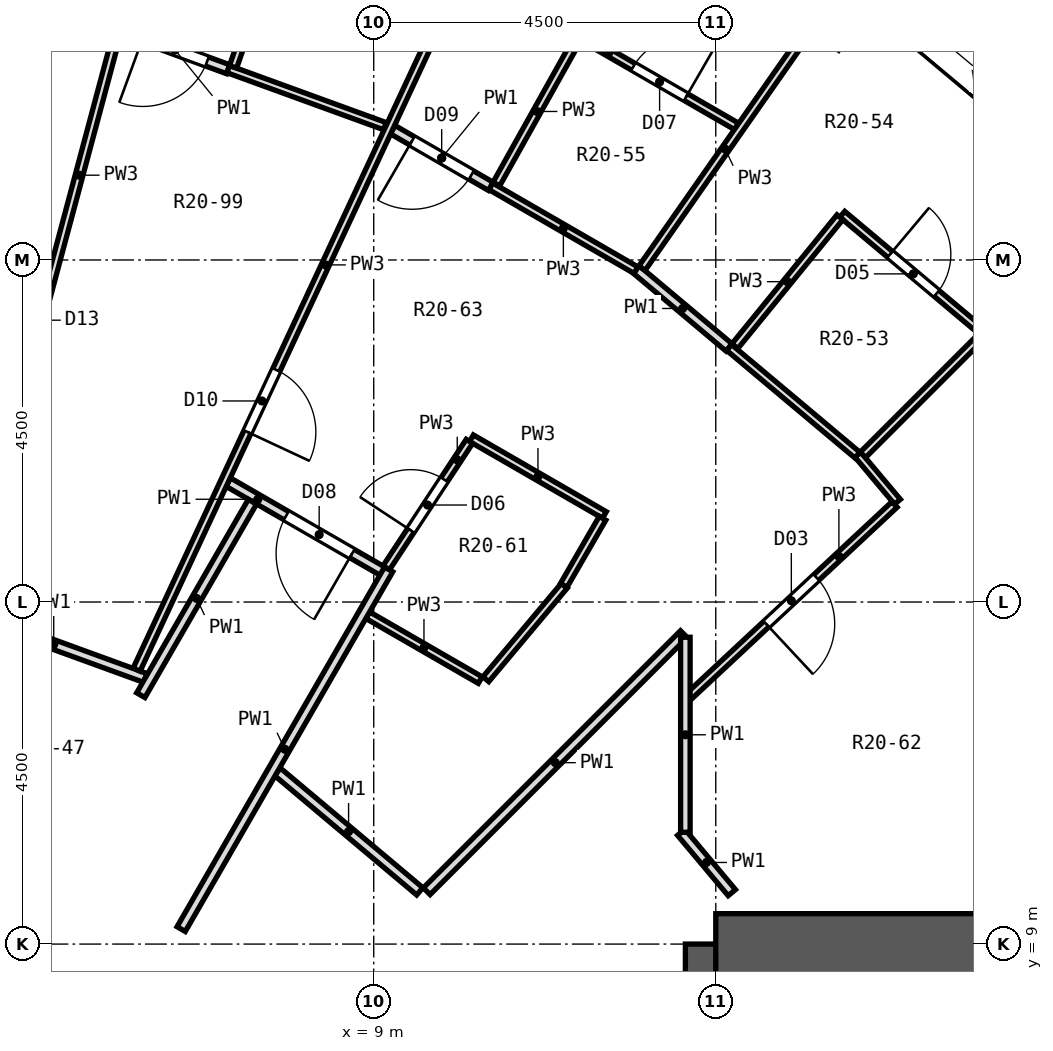
"""IFC4 building model, lengths in metres.
Left out: names, types, materials, properties, quantities, classifications, styles, units other than length and angle.
Written with IfcOpenShell. Run it as: python <this file> out.ifc"""

import sys

from ifc_helpers import new_model, si_unit, direction, frame, frame_2d, origin, place, context, subcontext, project, spatial, rectangle, extrude, element, fill, save


model = new_model("IFC4")
c1 = context("Model", 3, precision=1e-05, world=origin(), true_north=direction((0.0, 1.0)))
c2 = subcontext(c1, "Body", "Model", "MODEL_VIEW")
j1 = project(units=[si_unit("LENGTHUNIT", "METRE"), si_unit("PLANEANGLEUNIT", "RADIAN")], contexts=[c1])
p1 = place(None, origin())
s1 = spatial("IfcSite", under=j1, at=p1, CompositionType="ELEMENT")
p2 = place(p1, origin())
s2 = spatial("IfcBuilding", under=s1, at=p2, CompositionType="ELEMENT")
p3 = place(p2, frame((0.0, 0.0, 121.6)))
s3 = spatial("IfcBuildingStorey", under=s2, at=p3, CompositionType="ELEMENT", Elevation=121.6)
p4 = place(p3, frame((13.5, -9.0, 0.0), z_axis=(0.0, 0.0, 1.0), x_axis=(0.0, 1.0, 0.0)))
e1 = element("IfcWall", 1, at=p4, inside=s3, PredefinedType="SHEAR", context=c2, shape_type="SweptSolid", body=[
    extrude(rectangle(XDim=18.0, YDim=0.8, at=frame_2d((9.0, 0.0))), origin(), (0.0, 0.0, 1.0), 3.3),
])
p5 = place(p4, frame((15.4, 0.0, 0.0)))
e2 = element("IfcOpeningElement", 2, at=p5, cuts=e1, PredefinedType="OPENING", context=c2, shape_type="SweptSolid", body=[
    extrude(rectangle(XDim=1.2, YDim=2.1, at=frame_2d((0.6, 1.05))), frame((0.0, 0.412, 0.0), z_axis=(0.0, -1.0, 0.0), x_axis=(1.0, 0.0, 0.0)), (0.0, 0.0, 1.0), 0.824),
])
p6 = place(p4, frame((1.4, 0.0, 0.0)))
e3 = element("IfcOpeningElement", 3, at=p6, cuts=e1, PredefinedType="OPENING", context=c2, shape_type="SweptSolid", body=[
    extrude(rectangle(XDim=1.2, YDim=2.1, at=frame_2d((0.6, 1.05))), frame((0.0, 0.412, 0.0), z_axis=(0.0, -1.0, 0.0), x_axis=(1.0, 0.0, 0.0)), (0.0, 0.0, 1.0), 0.824),
])
p7 = place(p4, frame((7.5, 0.0, 0.0)))
e4 = element("IfcOpeningElement", 4, at=p7, cuts=e1, PredefinedType="OPENING", context=c2, shape_type="SweptSolid", body=[
    extrude(rectangle(XDim=3.0, YDim=2.4, at=frame_2d((1.5, 1.2))), frame((0.0, 0.412, 0.0), z_axis=(0.0, -1.0, 0.0), x_axis=(1.0, 0.0, 0.0)), (0.0, 0.0, 1.0), 0.824),
])
p8 = place(p3, frame((13.5, 9.0, 0.0), z_axis=(0.0, 0.0, 1.0), x_axis=(1.0, 0.0, 0.0)))
e5 = element("IfcWall", 5, at=p8, inside=s3, PredefinedType="SHEAR", context=c2, shape_type="SweptSolid", body=[
    extrude(rectangle(XDim=10.4, YDim=0.8, at=frame_2d((5.2, 0.0))), origin(), (0.0, 0.0, 1.0), 3.3),
])
p9 = place(p3, frame((18.494, 19.202, 0.0), z_axis=(0.0, 0.0, 1.0), x_axis=(-0.766055462616, 0.642774476932, 0.0)))
e6 = element("IfcWall", 6, at=p9, inside=s3, PredefinedType="SOLIDWALL", context=c2, shape_type="SweptSolid", body=[
    extrude(rectangle(XDim=3.648, YDim=0.6, at=frame_2d((1.824, 0.0))), origin(), (0.0, 0.0, 1.0), 2.8),
])
p10 = place(p9, frame((0.674, 0.0, 0.9)))
e7 = element("IfcOpeningElement", 7, at=p10, cuts=e6, PredefinedType="OPENING", context=c2, shape_type="SweptSolid", body=[
    extrude(rectangle(XDim=2.3, YDim=1.8, at=frame_2d((1.15, 0.9))), frame((0.0, 0.312, 0.0), z_axis=(0.0, -1.0, 0.0), x_axis=(1.0, 0.0, 0.0)), (0.0, 0.0, 1.0), 0.624),
])
p11 = place(p3, frame((13.045, 10.47, 0.0), z_axis=(0.0, 0.0, 1.0), x_axis=(0.642683640722, -0.766131671417, 0.0)))
e8 = element("IfcWall", 8, at=p11, inside=s3, PredefinedType="PARTITIONING", context=c2, shape_type="SweptSolid", body=[
    extrude(rectangle(XDim=1.036, YDim=0.125, at=frame_2d((0.518, 0.0))), origin(), (0.0, 0.0, 1.0), 2.8),
])
p12 = place(p3, frame((15.368, 15.44, 0.0), z_axis=(0.0, 0.0, 1.0), x_axis=(0.643079214365, -0.765799663131, 0.0)))
e9 = element("IfcWall", 9, at=p12, inside=s3, PredefinedType="PARTITIONING", context=c2, shape_type="SweptSolid", body=[
    extrude(rectangle(XDim=0.812, YDim=0.1, at=frame_2d((0.406, 0.0))), origin(), (0.0, 0.0, 1.0), 2.8),
])
p13 = place(p3, frame((7.733, 11.267, 0.0), z_axis=(0.0, 0.0, 1.0), x_axis=(0.765785489597, -0.643096092293, 0.0)))
e10 = element("IfcWall", 10, at=p13, inside=s3, PredefinedType="PARTITIONING", context=c2, shape_type="SweptSolid", body=[
    extrude(rectangle(XDim=2.446, YDim=0.125, at=frame_2d((1.223, 0.0))), origin(), (0.0, 0.0, 1.0), 2.8),
])
p14 = place(p3, frame((13.674, 16.85, 0.0), z_axis=(0.0, 0.0, 1.0), x_axis=(0.766138779905, -0.642675166725, 0.0)))
e11 = element("IfcWall", 11, at=p14, inside=s3, PredefinedType="PARTITIONING", context=c2, shape_type="SweptSolid", body=[
    extrude(rectangle(XDim=2.205, YDim=0.1, at=frame_2d((1.103, 0.0))), origin(), (0.0, 0.0, 1.0), 2.8),
])
p15 = place(p3, frame((12.454, 17.874, 0.0), z_axis=(0.0, 0.0, 1.0), x_axis=(0.765991783553, -0.642850361693, 0.0)))
e12 = element("IfcWall", 12, at=p15, inside=s3, PredefinedType="PARTITIONING", context=c2, shape_type="SweptSolid", body=[
    extrude(rectangle(XDim=1.592, YDim=0.125, at=frame_2d((0.796, 0.0))), origin(), (0.0, 0.0, 1.0), 2.8),
])
p16 = place(p3, frame((15.165, 18.601, 0.0), z_axis=(0.0, 0.0, 1.0), x_axis=(0.765894146118, -0.642966684161, 0.0)))
e13 = element("IfcWall", 13, at=p16, inside=s3, PredefinedType="PARTITIONING", context=c2, shape_type="SweptSolid", body=[
    extrude(rectangle(XDim=2.439, YDim=0.1, at=frame_2d((1.219, 0.0))), origin(), (0.0, 0.0, 1.0), 2.8),
])
p17 = place(p16, frame((0.819, 0.0, 0.0)))
e14 = element("IfcOpeningElement", 14, at=p17, cuts=e13, PredefinedType="OPENING", context=c2, shape_type="SweptSolid", body=[
    extrude(rectangle(XDim=0.8, YDim=2.1, at=frame_2d((0.4, 1.05))), frame((0.0, 0.062, 0.0), z_axis=(0.0, -1.0, 0.0), x_axis=(1.0, 0.0, 0.0)), (0.0, 0.0, 1.0), 0.124),
])
p18 = place(p3, frame((8.921, 13.327, 0.0), z_axis=(0.0, 0.0, 1.0), x_axis=(0.866168931404, -0.499751320429, 0.0)))
e15 = element("IfcWall", 15, at=p18, inside=s3, PredefinedType="PARTITIONING", context=c2, shape_type="SweptSolid", body=[
    extrude(rectangle(XDim=1.708, YDim=0.1, at=frame_2d((0.854, 0.0))), origin(), (0.0, 0.0, 1.0), 2.8),
])
p19 = place(p3, frame((7.086, 15.077, 0.0), z_axis=(0.0, 0.0, 1.0), x_axis=(0.866192474201, -0.499710513836, 0.0)))
e16 = element("IfcWall", 16, at=p19, inside=s3, PredefinedType="PARTITIONING", context=c2, shape_type="SweptSolid", body=[
    extrude(rectangle(XDim=2.36, YDim=0.125, at=frame_2d((1.18, 0.0))), origin(), (0.0, 0.0, 1.0), 2.8),
])
p20 = place(p19, frame((0.881, 0.0, 0.0)))
e17 = element("IfcOpeningElement", 17, at=p20, cuts=e16, PredefinedType="OPENING", context=c2, shape_type="SweptSolid", body=[
    extrude(rectangle(XDim=1.0, YDim=2.1, at=frame_2d((0.5, 1.05))), frame((0.0, 0.074, 0.0), z_axis=(0.0, -1.0, 0.0), x_axis=(1.0, 0.0, 0.0)), (0.0, 0.0, 1.0), 0.149),
])
p21 = place(p3, frame((10.286, 15.655, 0.0), z_axis=(0.0, 0.0, 1.0), x_axis=(0.865980246016, -0.500078207394, 0.0)))
e18 = element("IfcWall", 18, at=p21, inside=s3, PredefinedType="PARTITIONING", context=c2, shape_type="SweptSolid", body=[
    extrude(rectangle(XDim=2.02, YDim=0.1, at=frame_2d((1.01, 0.0))), origin(), (0.0, 0.0, 1.0), 2.8),
])
p22 = place(p3, frame((10.54, 18.969, 0.0), z_axis=(0.0, 0.0, 1.0), x_axis=(0.866006764117, -0.500032283461, 0.0)))
e19 = element("IfcWall", 19, at=p22, inside=s3, PredefinedType="PARTITIONING", context=c2, shape_type="SweptSolid", body=[
    extrude(rectangle(XDim=2.205, YDim=0.1, at=frame_2d((1.103, 0.0))), origin(), (0.0, 0.0, 1.0), 2.8),
])
p23 = place(p3, frame((9.248, 19.715, 0.0), z_axis=(0.0, 0.0, 1.0), x_axis=(0.865896584481, -0.500223055231, 0.0)))
e20 = element("IfcWall", 20, at=p23, inside=s3, PredefinedType="PARTITIONING", context=c2, shape_type="SweptSolid", body=[
    extrude(rectangle(XDim=1.491, YDim=0.125, at=frame_2d((0.746, 0.0))), origin(), (0.0, 0.0, 1.0), 2.8),
])
p24 = place(p23, frame((0.296, 0.0, 0.0)))
e21 = element("IfcOpeningElement", 21, at=p24, cuts=e20, PredefinedType="OPENING", context=c2, shape_type="SweptSolid", body=[
    extrude(rectangle(XDim=0.9, YDim=2.1, at=frame_2d((0.45, 1.05))), frame((0.0, 0.074, 0.0), z_axis=(0.0, -1.0, 0.0), x_axis=(1.0, 0.0, 0.0)), (0.0, 0.0, 1.0), 0.149),
])
p25 = place(p3, frame((11.705, 20.952, 0.0), z_axis=(0.0, 0.0, 1.0), x_axis=(0.865906392454, -0.500206077039, 0.0)))
e22 = element("IfcWall", 22, at=p25, inside=s3, PredefinedType="PARTITIONING", context=c2, shape_type="SweptSolid", body=[
    extrude(rectangle(XDim=2.389, YDim=0.1, at=frame_2d((1.194, 0.0))), origin(), (0.0, 0.0, 1.0), 2.8),
])
p26 = place(p25, frame((0.82, 0.0, 0.0)))
e23 = element("IfcOpeningElement", 23, at=p26, cuts=e22, PredefinedType="OPENING", context=c2, shape_type="SweptSolid", body=[
    extrude(rectangle(XDim=0.8, YDim=2.1, at=frame_2d((0.4, 1.05))), frame((0.0, 0.062, 0.0), z_axis=(0.0, -1.0, 0.0), x_axis=(1.0, 0.0, 0.0)), (0.0, 0.0, 1.0), 0.124),
])
p27 = place(p3, frame((5.684, 21.021, 0.0), z_axis=(0.0, 0.0, 1.0), x_axis=(0.939314629693, -0.343056885143, 0.0)))
e24 = element("IfcWall", 24, at=p27, inside=s3, PredefinedType="PARTITIONING", context=c2, shape_type="SweptSolid", body=[
    extrude(rectangle(XDim=1.492, YDim=0.125, at=frame_2d((0.746, 0.0))), origin(), (0.0, 0.0, 1.0), 2.8),
])
p28 = place(p27, frame((0.296, 0.0, 0.0)))
e25 = element("IfcOpeningElement", 25, at=p28, cuts=e24, PredefinedType="OPENING", context=c2, shape_type="SweptSolid", body=[
    extrude(rectangle(XDim=0.9, YDim=2.1, at=frame_2d((0.45, 1.05))), frame((0.0, 0.074, 0.0), z_axis=(0.0, -1.0, 0.0), x_axis=(1.0, 0.0, 0.0)), (0.0, 0.0, 1.0), 0.149),
])
p29 = place(p3, frame((3.585, 13.379, 0.0), z_axis=(0.0, 0.0, 1.0), x_axis=(0.939651552045, -0.342132957691, 0.0)))
e26 = element("IfcWall", 26, at=p29, inside=s3, PredefinedType="PARTITIONING", context=c2, shape_type="SweptSolid", body=[
    extrude(rectangle(XDim=2.564, YDim=0.125, at=frame_2d((1.282, 0.0))), origin(), (0.0, 0.0, 1.0), 2.8),
])
p30 = place(p3, frame((7.086, 20.51, 0.0), z_axis=(0.0, 0.0, 1.0), x_axis=(0.939734879809, -0.341904015289, 0.0)))
e27 = element("IfcWall", 27, at=p30, inside=s3, PredefinedType="PARTITIONING", context=c2, shape_type="SweptSolid", body=[
    extrude(rectangle(XDim=2.192, YDim=0.1, at=frame_2d((1.096, 0.0))), origin(), (0.0, 0.0, 1.0), 2.8),
])
p31 = place(p3, frame((13.146, 12.259, 0.0), z_axis=(0.0, 0.0, 1.0), x_axis=(0.731186864942, 0.682177226633, 0.0)))
e28 = element("IfcWall", 28, at=p31, inside=s3, PredefinedType="PARTITIONING", context=c2, shape_type="SweptSolid", body=[
    extrude(rectangle(XDim=3.701, YDim=0.1, at=frame_2d((1.851, 0.0))), origin(), (0.0, 0.0, 1.0), 2.8),
])
p32 = place(p31, frame((1.394, 0.0, 0.0)))
e29 = element("IfcOpeningElement", 29, at=p32, cuts=e28, PredefinedType="OPENING", context=c2, shape_type="SweptSolid", body=[
    extrude(rectangle(XDim=0.9, YDim=2.1, at=frame_2d((0.45, 1.05))), frame((0.0, 0.062, 0.0), z_axis=(0.0, -1.0, 0.0), x_axis=(1.0, 0.0, 0.0)), (0.0, 0.0, 1.0), 0.124),
])
p33 = place(p3, frame((15.436, 15.436, 0.0), z_axis=(0.0, 0.0, 1.0), x_axis=(0.707106781187, 0.707106781187, 0.0)))
e30 = element("IfcWall", 30, at=p33, inside=s3, PredefinedType="PARTITIONING", context=c2, shape_type="SweptSolid", body=[
    extrude(rectangle(XDim=2.208, YDim=0.1, at=frame_2d((1.104, 0.0))), origin(), (0.0, 0.0, 1.0), 2.8),
])
p34 = place(p3, frame((9.697, 9.695, 0.0), z_axis=(0.0, 0.0, 1.0), x_axis=(0.707106781187, 0.707106781187, 0.0)))
e31 = element("IfcWall", 31, at=p34, inside=s3, PredefinedType="PARTITIONING", context=c2, shape_type="SweptSolid", body=[
    extrude(rectangle(XDim=4.784, YDim=0.125, at=frame_2d((2.392, 0.0))), origin(), (0.0, 0.0, 1.0), 2.8),
])
p35 = place(p3, frame((10.475, 12.484, 0.0), z_axis=(0.0, 0.0, 1.0), x_axis=(0.642782067074, 0.766049093889, 0.0)))
e32 = element("IfcWall", 32, at=p35, inside=s3, PredefinedType="PARTITIONING", context=c2, shape_type="SweptSolid", body=[
    extrude(rectangle(XDim=1.606, YDim=0.1, at=frame_2d((0.803, 0.0))), origin(), (0.0, 0.0, 1.0), 2.8),
])
p36 = place(p3, frame((13.751, 16.866, 0.0), z_axis=(0.0, 0.0, 1.0), x_axis=(0.631692824826, 0.775218791738, 0.0)))
e33 = element("IfcWall", 33, at=p36, inside=s3, PredefinedType="PARTITIONING", context=c2, shape_type="SweptSolid", body=[
    extrude(rectangle(XDim=2.188, YDim=0.1, at=frame_2d((1.094, 0.0))), origin(), (0.0, 0.0, 1.0), 2.8),
])
p37 = place(p3, frame((12.53, 17.892, 0.0), z_axis=(0.0, 0.0, 1.0), x_axis=(0.573235132975, 0.819390921553, 0.0)))
e34 = element("IfcWall", 34, at=p37, inside=s3, PredefinedType="PARTITIONING", context=c2, shape_type="SweptSolid", body=[
    extrude(rectangle(XDim=3.823, YDim=0.1, at=frame_2d((1.911, 0.0))), origin(), (0.0, 0.0, 1.0), 2.8),
])
p38 = place(p3, frame((9.165, 13.95, 0.0), z_axis=(0.0, 0.0, 1.0), x_axis=(0.549454342873, 0.835523742989, 0.0)))
e35 = element("IfcWall", 35, at=p38, inside=s3, PredefinedType="PARTITIONING", context=c2, shape_type="SweptSolid", body=[
    extrude(rectangle(XDim=1.991, YDim=0.1, at=frame_2d((0.996, 0.0))), origin(), (0.0, 0.0, 1.0), 2.8),
])
p39 = place(p38, frame((0.589, 0.0, 0.0)))
e36 = element("IfcOpeningElement", 36, at=p39, cuts=e35, PredefinedType="OPENING", context=c2, shape_type="SweptSolid", body=[
    extrude(rectangle(XDim=0.8, YDim=2.1, at=frame_2d((0.4, 1.05))), frame((0.0, 0.062, 0.0), z_axis=(0.0, -1.0, 0.0), x_axis=(1.0, 0.0, 0.0)), (0.0, 0.0, 1.0), 0.124),
])
p40 = place(p3, frame((11.5, 13.719, 0.0), z_axis=(0.0, 0.0, 1.0), x_axis=(0.500337452138, 0.865830488022, 0.0)))
e37 = element("IfcWall", 37, at=p40, inside=s3, PredefinedType="PARTITIONING", context=c2, shape_type="SweptSolid", body=[
    extrude(rectangle(XDim=1.019, YDim=0.1, at=frame_2d((0.51, 0.0))), origin(), (0.0, 0.0, 1.0), 2.8),
])
p41 = place(p3, frame((6.467, 9.197, 0.0), z_axis=(0.0, 0.0, 1.0), x_axis=(0.499744377638, 0.866172937132, 0.0)))
e38 = element("IfcWall", 38, at=p41, inside=s3, PredefinedType="PARTITIONING", context=c2, shape_type="SweptSolid", body=[
    extrude(rectangle(XDim=5.463, YDim=0.125, at=frame_2d((2.731, 0.0))), origin(), (0.0, 0.0, 1.0), 2.8),
])
p42 = place(p3, frame((5.936, 12.275, 0.0), z_axis=(0.0, 0.0, 1.0), x_axis=(0.499715257766, 0.866189737388, 0.0)))
e39 = element("IfcWall", 39, at=p42, inside=s3, PredefinedType="PARTITIONING", context=c2, shape_type="SweptSolid", body=[
    extrude(rectangle(XDim=2.937, YDim=0.125, at=frame_2d((1.469, 0.0))), origin(), (0.0, 0.0, 1.0), 2.8),
])
p43 = place(p3, frame((10.614, 18.999, 0.0), z_axis=(0.0, 0.0, 1.0), x_axis=(0.487811352464, 0.872949073204, 0.0)))
e40 = element("IfcWall", 40, at=p43, inside=s3, PredefinedType="PARTITIONING", context=c2, shape_type="SweptSolid", body=[
    extrude(rectangle(XDim=2.188, YDim=0.1, at=frame_2d((1.094, 0.0))), origin(), (0.0, 0.0, 1.0), 2.8),
])
p44 = place(p3, frame((5.881, 12.611, 0.0), z_axis=(0.0, 0.0, 1.0), x_axis=(0.422604500324, 0.906314203964, 0.0)))
e41 = element("IfcWall", 41, at=p44, inside=s3, PredefinedType="PARTITIONING", context=c2, shape_type="SweptSolid", body=[
    extrude(rectangle(XDim=11.75, YDim=0.1, at=frame_2d((5.875, 0.0))), origin(), (0.0, 0.0, 1.0), 2.8),
])
p45 = place(p44, frame((3.45, 0.0, 0.0)))
e42 = element("IfcOpeningElement", 42, at=p45, cuts=e41, PredefinedType="OPENING", context=c2, shape_type="SweptSolid", body=[
    extrude(rectangle(XDim=0.9, YDim=2.1, at=frame_2d((0.45, 1.05))), frame((0.0, 0.062, 0.0), z_axis=(0.0, -1.0, 0.0), x_axis=(1.0, 0.0, 0.0)), (0.0, 0.0, 1.0), 0.124),
])
p46 = place(p3, frame((7.149, 20.541, 0.0), z_axis=(0.0, 0.0, 1.0), x_axis=(0.328718620018, 0.944427905588, 0.0)))
e43 = element("IfcWall", 43, at=p46, inside=s3, PredefinedType="PARTITIONING", context=c2, shape_type="SweptSolid", body=[
    extrude(rectangle(XDim=2.2, YDim=0.1, at=frame_2d((1.1, 0.0))), origin(), (0.0, 0.0, 1.0), 2.8),
])
p47 = place(p3, frame((3.605, 13.44, 0.0), z_axis=(0.0, 0.0, 1.0), x_axis=(0.258538057112, 0.966001072994, 0.0)))
e44 = element("IfcWall", 44, at=p47, inside=s3, PredefinedType="PARTITIONING", context=c2, shape_type="SweptSolid", body=[
    extrude(rectangle(XDim=11.75, YDim=0.1, at=frame_2d((5.875, 0.0))), origin(), (0.0, 0.0, 1.0), 2.8),
])
p48 = place(p47, frame((3.45, 0.0, 0.0)))
e45 = element("IfcOpeningElement", 45, at=p48, cuts=e44, PredefinedType="OPENING", context=c2, shape_type="SweptSolid", body=[
    extrude(rectangle(XDim=0.9, YDim=2.1, at=frame_2d((0.45, 1.05))), frame((0.0, 0.062, 0.0), z_axis=(0.0, -1.0, 0.0), x_axis=(1.0, 0.0, 0.0)), (0.0, 0.0, 1.0), 0.124),
])
p49 = place(p3, frame((13.1, 10.47, 0.0), z_axis=(0.0, 0.0, 1.0), x_axis=(0.0, 1.0, 0.0)))
e46 = element("IfcWall", 46, at=p49, inside=s3, PredefinedType="PARTITIONING", context=c2, shape_type="SweptSolid", body=[
    extrude(rectangle(XDim=2.566, YDim=0.125, at=frame_2d((1.283, 0.0))), origin(), (0.0, 0.0, 1.0), 2.8),
])
p50 = place(p10, origin())
e47 = element("IfcWindow", 47, at=p50, inside=s3, PartitioningType="SINGLE_PANEL", PredefinedType="WINDOW", context=c2, shape_type="SweptSolid", body=[
    extrude(rectangle(XDim=2.3, YDim=1.8, at=frame_2d((1.15, 0.9))), frame((0.0, 0.18, 0.0), z_axis=(0.0, -1.0, 0.0), x_axis=(1.0, 0.0, 0.0)), (0.0, 0.0, 1.0), 0.06),
])
fill(e7, e47)
p51 = place(p32, frame((0.9, 0.0, 0.0), z_axis=(0.0, 0.0, 1.0), x_axis=(-1.0, 0.0, 0.0)))
e48 = element("IfcDoor", 48, at=p51, inside=s3, OperationType="SINGLE_SWING_RIGHT", PredefinedType="DOOR", context=c2, shape_type="SweptSolid", body=[
    extrude(rectangle(XDim=0.9, YDim=2.1, at=frame_2d((0.45, 1.05))), frame((0.0, 0.025, 0.0), z_axis=(0.0, -1.0, 0.0), x_axis=(1.0, 0.0, 0.0)), (0.0, 0.0, 1.0), 0.05),
])
fill(e29, e48)
p52 = place(p17, origin())
e49 = element("IfcDoor", 49, at=p52, inside=s3, OperationType="SINGLE_SWING_LEFT", PredefinedType="DOOR", context=c2, shape_type="SweptSolid", body=[
    extrude(rectangle(XDim=0.8, YDim=2.1, at=frame_2d((0.4, 1.05))), frame((0.0, 0.025, 0.0), z_axis=(0.0, -1.0, 0.0), x_axis=(1.0, 0.0, 0.0)), (0.0, 0.0, 1.0), 0.05),
])
fill(e14, e49)
p53 = place(p39, origin())
e50 = element("IfcDoor", 50, at=p53, inside=s3, OperationType="SINGLE_SWING_LEFT", PredefinedType="DOOR", context=c2, shape_type="SweptSolid", body=[
    extrude(rectangle(XDim=0.8, YDim=2.1, at=frame_2d((0.4, 1.05))), frame((0.0, 0.025, 0.0), z_axis=(0.0, -1.0, 0.0), x_axis=(1.0, 0.0, 0.0)), (0.0, 0.0, 1.0), 0.05),
])
fill(e36, e50)
p54 = place(p26, origin())
e51 = element("IfcDoor", 51, at=p54, inside=s3, OperationType="SINGLE_SWING_RIGHT", PredefinedType="DOOR", context=c2, shape_type="SweptSolid", body=[
    extrude(rectangle(XDim=0.8, YDim=2.1, at=frame_2d((0.4, 1.05))), frame((0.0, 0.025, 0.0), z_axis=(0.0, -1.0, 0.0), x_axis=(1.0, 0.0, 0.0)), (0.0, 0.0, 1.0), 0.05),
])
fill(e23, e51)
p55 = place(p20, frame((1.0, 0.0, 0.0), z_axis=(0.0, 0.0, 1.0), x_axis=(-1.0, 0.0, 0.0)))
e52 = element("IfcDoor", 52, at=p55, inside=s3, OperationType="SINGLE_SWING_LEFT", PredefinedType="DOOR", context=c2, shape_type="SweptSolid", body=[
    extrude(rectangle(XDim=1.0, YDim=2.1, at=frame_2d((0.5, 1.05))), frame((0.0, 0.025, 0.0), z_axis=(0.0, -1.0, 0.0), x_axis=(1.0, 0.0, 0.0)), (0.0, 0.0, 1.0), 0.05),
])
fill(e17, e52)
p56 = place(p24, frame((0.9, 0.0, 0.0), z_axis=(0.0, 0.0, 1.0), x_axis=(-1.0, 0.0, 0.0)))
e53 = element("IfcDoor", 53, at=p56, inside=s3, OperationType="SINGLE_SWING_RIGHT", PredefinedType="DOOR", context=c2, shape_type="SweptSolid", body=[
    extrude(rectangle(XDim=0.9, YDim=2.1, at=frame_2d((0.45, 1.05))), frame((0.0, 0.025, 0.0), z_axis=(0.0, -1.0, 0.0), x_axis=(1.0, 0.0, 0.0)), (0.0, 0.0, 1.0), 0.05),
])
fill(e21, e53)
p57 = place(p45, frame((0.9, 0.0, 0.0), z_axis=(0.0, 0.0, 1.0), x_axis=(-1.0, 0.0, 0.0)))
e54 = element("IfcDoor", 54, at=p57, inside=s3, OperationType="SINGLE_SWING_RIGHT", PredefinedType="DOOR", context=c2, shape_type="SweptSolid", body=[
    extrude(rectangle(XDim=0.9, YDim=2.1, at=frame_2d((0.45, 1.05))), frame((0.0, 0.025, 0.0), z_axis=(0.0, -1.0, 0.0), x_axis=(1.0, 0.0, 0.0)), (0.0, 0.0, 1.0), 0.05),
])
fill(e42, e54)
p58 = place(p28, frame((0.9, 0.0, 0.0), z_axis=(0.0, 0.0, 1.0), x_axis=(-1.0, 0.0, 0.0)))
e55 = element("IfcDoor", 55, at=p58, inside=s3, OperationType="SINGLE_SWING_RIGHT", PredefinedType="DOOR", context=c2, shape_type="SweptSolid", body=[
    extrude(rectangle(XDim=0.9, YDim=2.1, at=frame_2d((0.45, 1.05))), frame((0.0, 0.025, 0.0), z_axis=(0.0, -1.0, 0.0), x_axis=(1.0, 0.0, 0.0)), (0.0, 0.0, 1.0), 0.05),
])
fill(e25, e55)
save(model, sys.argv[1])
